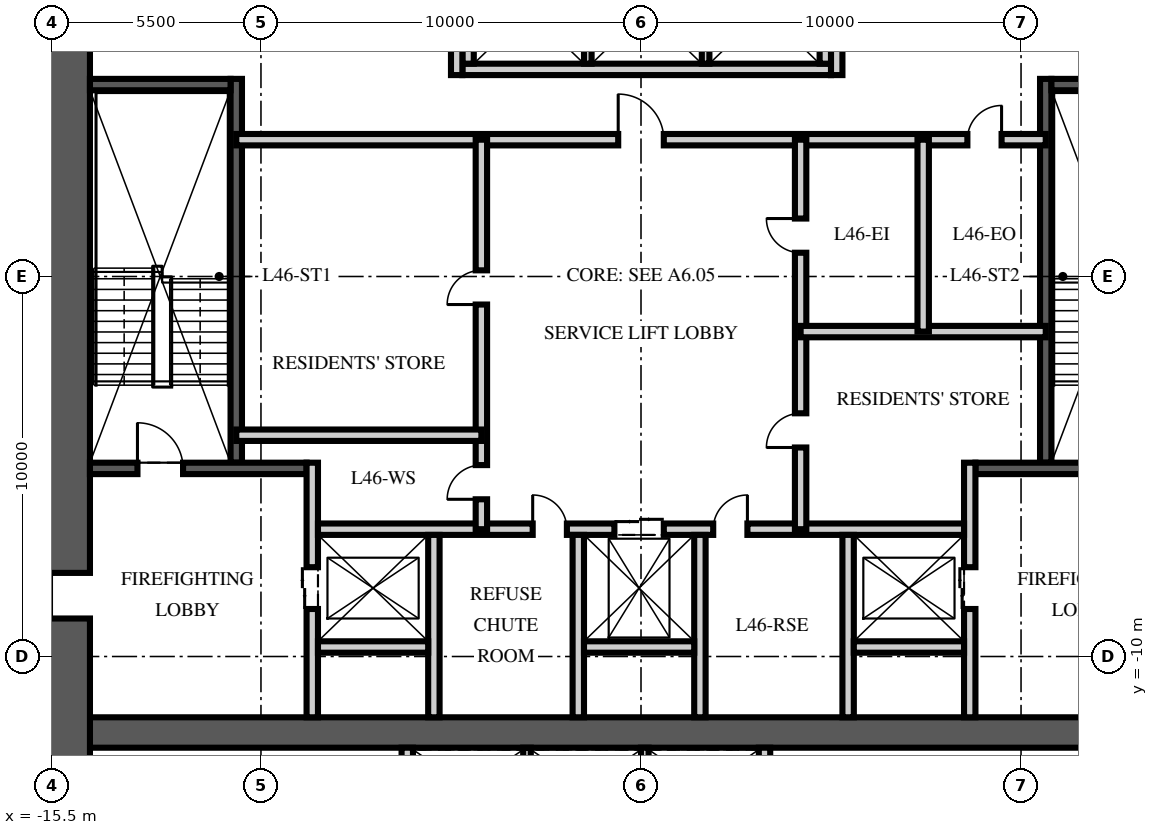
"""IFC4 building model, lengths in metres.
Left out: names, types, materials, properties, quantities, classifications, styles, units other than length and angle.
Written with IfcOpenShell. Run it as: python <this file> out.ifc"""

import sys

from ifc_helpers import new_model, si_unit, direction, frame, frame_2d, origin, place, context, subcontext, project, spatial, rectangle, extrude, element, fill, save


model = new_model("IFC4")
c1 = context("Model", 3, precision=1e-05, world=origin(), true_north=direction((0.0, 1.0)))
c2 = subcontext(c1, "Body", "Model", "MODEL_VIEW")
j1 = project(units=[si_unit("LENGTHUNIT", "METRE"), si_unit("PLANEANGLEUNIT", "RADIAN")], contexts=[c1])
p1 = place(None, origin())
s1 = spatial("IfcSite", under=j1, at=p1, CompositionType="ELEMENT")
p2 = place(p1, origin())
s2 = spatial("IfcBuilding", under=s1, at=p2, CompositionType="ELEMENT")
p3 = place(p2, frame((0.0, 0.0, 182.25)))
s3 = spatial("IfcBuildingStorey", under=s2, at=p3, CompositionType="ELEMENT", Elevation=182.25)
p4 = place(p3, frame((-15.5, -12.0, -0.25), z_axis=(0.0, 0.0, 1.0), x_axis=(1.0, 0.0, 0.0)))
e1 = element("IfcWall", 1, at=p4, inside=s3, PredefinedType="SHEAR", context=c2, shape_type="SweptSolid", body=[
    extrude(rectangle(XDim=31.0, YDim=0.8, at=frame_2d((15.5, 0.0))), origin(), (0.0, 0.0, 1.0), 3.7),
])
p5 = place(p3, frame((-15.5, -15.5, -0.25), z_axis=(0.0, 0.0, 1.0), x_axis=(0.0, 1.0, 0.0)))
e2 = element("IfcWall", 2, at=p5, inside=s3, PredefinedType="SHEAR", context=c2, shape_type="SweptSolid", body=[
    extrude(rectangle(XDim=31.0, YDim=2.0, at=frame_2d((15.5, 0.0))), origin(), (0.0, 0.0, 1.0), 3.7),
])
p6 = place(p5, frame((6.5, 0.0, 0.25)))
e3 = element("IfcOpeningElement", 3, at=p6, cuts=e2, PredefinedType="OPENING", context=c2, shape_type="SweptSolid", body=[
    extrude(rectangle(XDim=1.2, YDim=2.1, at=frame_2d((0.6, 1.05))), frame((0.0, 1.01, 0.0), z_axis=(0.0, -1.0, 0.0), x_axis=(1.0, 0.0, 0.0)), (0.0, 0.0, 1.0), 2.02),
])
p7 = place(p5, frame((23.0, 0.0, 0.25)))
e4 = element("IfcOpeningElement", 4, at=p7, cuts=e2, PredefinedType="OPENING", context=c2, shape_type="SweptSolid", body=[
    extrude(rectangle(XDim=1.8, YDim=2.1, at=frame_2d((0.9, 1.05))), frame((0.0, 1.01, 0.0), z_axis=(0.0, -1.0, 0.0), x_axis=(1.0, 0.0, 0.0)), (0.0, 0.0, 1.0), 2.02),
])
p8 = place(p3, frame((-10.65, -4.9, 0.0), z_axis=(0.0, 0.0, 1.0), x_axis=(0.0, 1.0, 0.0)))
e5 = element("IfcWall", 5, at=p8, inside=s3, PredefinedType="SOLIDWALL", context=c2, shape_type="SweptSolid", body=[
    extrude(rectangle(XDim=10.1, YDim=0.3, at=frame_2d((5.05, 0.0))), origin(), (0.0, 0.0, 1.0), 3.45),
])
p9 = place(p3, frame((-14.5, -5.05, 0.0), z_axis=(0.0, 0.0, 1.0), x_axis=(1.0, 0.0, 0.0)))
e6 = element("IfcWall", 6, at=p9, inside=s3, PredefinedType="SOLIDWALL", context=c2, shape_type="SweptSolid", body=[
    extrude(rectangle(XDim=5.7, YDim=0.3, at=frame_2d((2.85, 0.0))), origin(), (0.0, 0.0, 1.0), 3.45),
])
p10 = place(p9, frame((1.25, 0.0, 0.0)))
e7 = element("IfcOpeningElement", 7, at=p10, cuts=e6, PredefinedType="OPENING", context=c2, shape_type="SweptSolid", body=[
    extrude(rectangle(XDim=1.2, YDim=2.1, at=frame_2d((0.6, 1.05))), frame((0.0, 0.16, 0.0), z_axis=(0.0, -1.0, 0.0), x_axis=(1.0, 0.0, 0.0)), (0.0, 0.0, 1.0), 0.32),
])
p11 = place(p3, frame((-14.5, 5.05, 0.0), z_axis=(0.0, 0.0, 1.0), x_axis=(1.0, 0.0, 0.0)))
e8 = element("IfcWall", 8, at=p11, inside=s3, PredefinedType="SOLIDWALL", context=c2, shape_type="SweptSolid", body=[
    extrude(rectangle(XDim=3.7, YDim=0.3, at=frame_2d((1.85, 0.0))), origin(), (0.0, 0.0, 1.0), 3.45),
])
p12 = place(p3, frame((-8.65, -11.6, 0.0), z_axis=(0.0, 0.0, 1.0), x_axis=(0.0, 1.0, 0.0)))
e9 = element("IfcWall", 9, at=p12, inside=s3, PredefinedType="PARTITIONING", context=c2, shape_type="SweptSolid", body=[
    extrude(rectangle(XDim=6.7, YDim=0.3, at=frame_2d((3.35, 0.0))), origin(), (0.0, 0.0, 1.0), 3.45),
])
p13 = place(p12, frame((2.85, 0.0, 0.0)))
e10 = element("IfcOpeningElement", 10, at=p13, cuts=e9, PredefinedType="OPENING", context=c2, shape_type="SweptSolid", body=[
    extrude(rectangle(XDim=1.1, YDim=2.1, at=frame_2d((0.55, 1.05))), frame((0.0, 0.16, 0.0), z_axis=(0.0, -1.0, 0.0), x_axis=(1.0, 0.0, 0.0)), (0.0, 0.0, 1.0), 0.32),
])
p14 = place(p3, frame((10.65, -4.9, 0.0), z_axis=(0.0, 0.0, 1.0), x_axis=(0.0, 1.0, 0.0)))
e11 = element("IfcWall", 11, at=p14, inside=s3, PredefinedType="SOLIDWALL", context=c2, shape_type="SweptSolid", body=[
    extrude(rectangle(XDim=10.1, YDim=0.3, at=frame_2d((5.05, 0.0))), origin(), (0.0, 0.0, 1.0), 3.45),
])
p15 = place(p3, frame((14.5, -5.05, 0.0), z_axis=(0.0, 0.0, 1.0), x_axis=(-1.0, 0.0, 0.0)))
e12 = element("IfcWall", 12, at=p15, inside=s3, PredefinedType="SOLIDWALL", context=c2, shape_type="SweptSolid", body=[
    extrude(rectangle(XDim=5.7, YDim=0.3, at=frame_2d((2.85, 0.0))), origin(), (0.0, 0.0, 1.0), 3.45),
])
p16 = place(p15, frame((1.25, 0.0, 0.0)))
e13 = element("IfcOpeningElement", 13, at=p16, cuts=e12, PredefinedType="OPENING", context=c2, shape_type="SweptSolid", body=[
    extrude(rectangle(XDim=1.2, YDim=2.1, at=frame_2d((0.6, 1.05))), frame((0.0, 0.16, 0.0), z_axis=(0.0, -1.0, 0.0), x_axis=(1.0, 0.0, 0.0)), (0.0, 0.0, 1.0), 0.32),
])
p17 = place(p3, frame((14.5, 5.05, 0.0), z_axis=(0.0, 0.0, 1.0), x_axis=(-1.0, 0.0, 0.0)))
e14 = element("IfcWall", 14, at=p17, inside=s3, PredefinedType="SOLIDWALL", context=c2, shape_type="SweptSolid", body=[
    extrude(rectangle(XDim=3.7, YDim=0.3, at=frame_2d((1.85, 0.0))), origin(), (0.0, 0.0, 1.0), 3.45),
])
p18 = place(p3, frame((8.65, -11.6, 0.0), z_axis=(0.0, 0.0, 1.0), x_axis=(0.0, 1.0, 0.0)))
e15 = element("IfcWall", 15, at=p18, inside=s3, PredefinedType="PARTITIONING", context=c2, shape_type="SweptSolid", body=[
    extrude(rectangle(XDim=6.7, YDim=0.3, at=frame_2d((3.35, 0.0))), origin(), (0.0, 0.0, 1.0), 3.45),
])
p19 = place(p18, frame((2.85, 0.0, 0.0)))
e16 = element("IfcOpeningElement", 16, at=p19, cuts=e15, PredefinedType="OPENING", context=c2, shape_type="SweptSolid", body=[
    extrude(rectangle(XDim=1.1, YDim=2.1, at=frame_2d((0.55, 1.05))), frame((0.0, 0.16, 0.0), z_axis=(0.0, -1.0, 0.0), x_axis=(1.0, 0.0, 0.0)), (0.0, 0.0, 1.0), 0.32),
])
p20 = place(p3, frame((-8.5, -6.65, 0.0), z_axis=(0.0, 0.0, 1.0), x_axis=(1.0, 0.0, 0.0)))
e17 = element("IfcWall", 17, at=p20, inside=s3, PredefinedType="PARTITIONING", context=c2, shape_type="SweptSolid", body=[
    extrude(rectangle(XDim=17.0, YDim=0.3, at=frame_2d((8.5, 0.0))), origin(), (0.0, 0.0, 1.0), 3.45),
])
p21 = place(p20, frame((7.8, 0.0, 0.0)))
e18 = element("IfcOpeningElement", 18, at=p21, cuts=e17, PredefinedType="OPENING", context=c2, shape_type="SweptSolid", body=[
    extrude(rectangle(XDim=1.3, YDim=2.4, at=frame_2d((0.65, 1.2))), frame((0.0, 0.16, 0.0), z_axis=(0.0, -1.0, 0.0), x_axis=(1.0, 0.0, 0.0)), (0.0, 0.0, 1.0), 0.32),
])
p22 = place(p20, frame((5.65, 0.0, 0.0)))
e19 = element("IfcOpeningElement", 19, at=p22, cuts=e17, PredefinedType="OPENING", context=c2, shape_type="SweptSolid", body=[
    extrude(rectangle(XDim=0.9, YDim=2.1, at=frame_2d((0.45, 1.05))), frame((0.0, 0.16, 0.0), z_axis=(0.0, -1.0, 0.0), x_axis=(1.0, 0.0, 0.0)), (0.0, 0.0, 1.0), 0.32),
])
p23 = place(p20, frame((10.4, 0.0, 0.0)))
e20 = element("IfcOpeningElement", 20, at=p23, cuts=e17, PredefinedType="OPENING", context=c2, shape_type="SweptSolid", body=[
    extrude(rectangle(XDim=0.9, YDim=2.1, at=frame_2d((0.45, 1.05))), frame((0.0, 0.16, 0.0), z_axis=(0.0, -1.0, 0.0), x_axis=(1.0, 0.0, 0.0)), (0.0, 0.0, 1.0), 0.32),
])
for number, where, z_axis, x_axis in (
    (21, (-5.45, -11.6, 0.0), (0.0, 0.0, 1.0), (0.0, 1.0, 0.0)),
    (22, (-1.65, -11.6, 0.0), (0.0, 0.0, 1.0), (0.0, 1.0, 0.0)),
    (23, (1.55, -11.6, 0.0), (0.0, 0.0, 1.0), (0.0, 1.0, 0.0)),
    (24, (5.45, -11.6, 0.0), (0.0, 0.0, 1.0), (0.0, 1.0, 0.0)),
):
    element("IfcWall", number, at=place(p3, frame(where, z_axis=z_axis, x_axis=x_axis)), inside=s3, PredefinedType="PARTITIONING", context=c2, shape_type="SweptSolid", body=[
        extrude(rectangle(XDim=4.8, YDim=0.3, at=frame_2d((2.4, 0.0))), origin(), (0.0, 0.0, 1.0), 3.45),
    ])
for number, where, z_axis, x_axis in (
    (25, (-8.5, -9.75, 0.0), (0.0, 0.0, 1.0), (1.0, 0.0, 0.0)),
    (26, (-1.5, -9.75, 0.0), (0.0, 0.0, 1.0), (1.0, 0.0, 0.0)),
    (27, (5.6, -9.75, 0.0), (0.0, 0.0, 1.0), (1.0, 0.0, 0.0)),
):
    element("IfcWall", number, at=place(p3, frame(where, z_axis=z_axis, x_axis=x_axis)), inside=s3, PredefinedType="PARTITIONING", context=c2, shape_type="SweptSolid", body=[
        extrude(rectangle(XDim=2.9, YDim=0.3, at=frame_2d((1.45, 0.0))), origin(), (0.0, 0.0, 1.0), 3.45),
    ])
p24 = place(p3, frame((-4.7, 5.45, 0.0), z_axis=(0.0, 0.0, 1.0), x_axis=(1.0, 0.0, 0.0)))
e28 = element("IfcWall", 28, at=p24, inside=s3, PredefinedType="PARTITIONING", context=c2, shape_type="SweptSolid", body=[
    extrude(rectangle(XDim=9.7, YDim=0.3, at=frame_2d((4.85, 0.0))), origin(), (0.0, 0.0, 1.0), 3.45),
])
for number, where, z_axis, x_axis in (
    (29, (-4.55, 5.6, 0.0), (0.0, 0.0, 1.0), (0.0, 1.0, 0.0)),
    (30, (4.85, 5.6, 0.0), (0.0, 0.0, 1.0), (0.0, 1.0, 0.0)),
):
    element("IfcWall", number, at=place(p3, frame(where, z_axis=z_axis, x_axis=x_axis)), inside=s3, PredefinedType="PARTITIONING", context=c2, shape_type="SweptSolid", body=[
        extrude(rectangle(XDim=2.8, YDim=0.3, at=frame_2d((1.4, 0.0))), origin(), (0.0, 0.0, 1.0), 3.45),
    ])
for number, where, z_axis, x_axis in (
    (31, (-1.4, 5.6, 0.0), (0.0, 0.0, 1.0), (0.0, 1.0, 0.0)),
    (32, (1.7, 5.6, 0.0), (0.0, 0.0, 1.0), (0.0, 1.0, 0.0)),
):
    element("IfcWall", number, at=place(p3, frame(where, z_axis=z_axis, x_axis=x_axis)), inside=s3, PredefinedType="PARTITIONING", context=c2, shape_type="SweptSolid", body=[
        extrude(rectangle(XDim=2.8, YDim=0.2, at=frame_2d((1.4, 0.0))), origin(), (0.0, 0.0, 1.0), 3.45),
    ])
for number, where, z_axis, x_axis in (
    (33, (-6.15, -14.5, 0.0), (0.0, 0.0, 1.0), (0.0, 1.0, 0.0)),
    (34, (3.25, -14.5, 0.0), (0.0, 0.0, 1.0), (0.0, 1.0, 0.0)),
):
    element("IfcWall", number, at=place(p3, frame(where, z_axis=z_axis, x_axis=x_axis)), inside=s3, PredefinedType="PARTITIONING", context=c2, shape_type="SweptSolid", body=[
        extrude(rectangle(XDim=2.1, YDim=0.3, at=frame_2d((1.05, 0.0))), origin(), (0.0, 0.0, 1.0), 3.45),
    ])
for number, where, z_axis, x_axis in (
    (35, (-3.0, -14.5, 0.0), (0.0, 0.0, 1.0), (0.0, 1.0, 0.0)),
    (36, (0.1, -14.5, 0.0), (0.0, 0.0, 1.0), (0.0, 1.0, 0.0)),
):
    element("IfcWall", number, at=place(p3, frame(where, z_axis=z_axis, x_axis=x_axis)), inside=s3, PredefinedType="PARTITIONING", context=c2, shape_type="SweptSolid", body=[
        extrude(rectangle(XDim=2.1, YDim=0.2, at=frame_2d((1.05, 0.0))), origin(), (0.0, 0.0, 1.0), 3.45),
    ])
p25 = place(p3, frame((-10.65, 3.6, 0.0), z_axis=(0.0, 0.0, 1.0), x_axis=(1.0, 0.0, 0.0)))
e37 = element("IfcWall", 37, at=p25, inside=s3, PredefinedType="PARTITIONING", context=c2, shape_type="SweptSolid", body=[
    extrude(rectangle(XDim=21.3, YDim=0.3, at=frame_2d((10.65, 0.0))), origin(), (0.0, 0.0, 1.0), 3.45),
])
p26 = place(p25, frame((10.05, 0.0, 0.0)))
e38 = element("IfcOpeningElement", 38, at=p26, cuts=e37, PredefinedType="OPENING", context=c2, shape_type="SweptSolid", body=[
    extrude(rectangle(XDim=1.2, YDim=2.1, at=frame_2d((0.6, 1.05))), frame((0.0, 0.16, 0.0), z_axis=(0.0, -1.0, 0.0), x_axis=(1.0, 0.0, 0.0)), (0.0, 0.0, 1.0), 0.32),
])
p27 = place(p25, frame((19.238, 0.0, 0.0)))
e39 = element("IfcOpeningElement", 39, at=p27, cuts=e37, PredefinedType="OPENING", context=c2, shape_type="SweptSolid", body=[
    extrude(rectangle(XDim=0.9, YDim=2.1, at=frame_2d((0.45, 1.05))), frame((0.0, 0.16, 0.0), z_axis=(0.0, -1.0, 0.0), x_axis=(1.0, 0.0, 0.0)), (0.0, 0.0, 1.0), 0.32),
])
p28 = place(p3, frame((-4.2, -6.65, 0.0), z_axis=(0.0, 0.0, 1.0), x_axis=(0.0, 1.0, 0.0)))
e40 = element("IfcWall", 40, at=p28, inside=s3, PredefinedType="PARTITIONING", context=c2, shape_type="SweptSolid", body=[
    extrude(rectangle(XDim=10.25, YDim=0.3, at=frame_2d((5.125, 0.0))), origin(), (0.0, 0.0, 1.0), 3.45),
])
p29 = place(p28, frame((0.787, 0.0, 0.0)))
e41 = element("IfcOpeningElement", 41, at=p29, cuts=e40, PredefinedType="OPENING", context=c2, shape_type="SweptSolid", body=[
    extrude(rectangle(XDim=0.9, YDim=2.1, at=frame_2d((0.45, 1.05))), frame((0.0, 0.16, 0.0), z_axis=(0.0, -1.0, 0.0), x_axis=(1.0, 0.0, 0.0)), (0.0, 0.0, 1.0), 0.32),
])
p30 = place(p28, frame((5.912, 0.0, 0.0)))
e42 = element("IfcOpeningElement", 42, at=p30, cuts=e40, PredefinedType="OPENING", context=c2, shape_type="SweptSolid", body=[
    extrude(rectangle(XDim=0.9, YDim=2.1, at=frame_2d((0.45, 1.05))), frame((0.0, 0.16, 0.0), z_axis=(0.0, -1.0, 0.0), x_axis=(1.0, 0.0, 0.0)), (0.0, 0.0, 1.0), 0.32),
])
p31 = place(p3, frame((4.2, -6.65, 0.0), z_axis=(0.0, 0.0, 1.0), x_axis=(0.0, 1.0, 0.0)))
e43 = element("IfcWall", 43, at=p31, inside=s3, PredefinedType="PARTITIONING", context=c2, shape_type="SweptSolid", body=[
    extrude(rectangle(XDim=10.25, YDim=0.3, at=frame_2d((5.125, 0.0))), origin(), (0.0, 0.0, 1.0), 3.45),
])
p32 = place(p31, frame((2.15, 0.0, 0.0)))
e44 = element("IfcOpeningElement", 44, at=p32, cuts=e43, PredefinedType="OPENING", context=c2, shape_type="SweptSolid", body=[
    extrude(rectangle(XDim=0.9, YDim=2.1, at=frame_2d((0.45, 1.05))), frame((0.0, 0.16, 0.0), z_axis=(0.0, -1.0, 0.0), x_axis=(1.0, 0.0, 0.0)), (0.0, 0.0, 1.0), 0.32),
])
p33 = place(p31, frame((7.275, 0.0, 0.0)))
e45 = element("IfcOpeningElement", 45, at=p33, cuts=e43, PredefinedType="OPENING", context=c2, shape_type="SweptSolid", body=[
    extrude(rectangle(XDim=0.9, YDim=2.1, at=frame_2d((0.45, 1.05))), frame((0.0, 0.16, 0.0), z_axis=(0.0, -1.0, 0.0), x_axis=(1.0, 0.0, 0.0)), (0.0, 0.0, 1.0), 0.32),
])
for number, where, z_axis, x_axis in (
    (46, (-10.65, -4.177, 0.0), (0.0, 0.0, 1.0), (1.0, 0.0, 0.0)),
    (47, (10.65, -1.45, 0.0), (0.0, 0.0, 1.0), (-1.0, 0.0, 0.0)),
):
    element("IfcWall", number, at=place(p3, frame(where, z_axis=z_axis, x_axis=x_axis)), inside=s3, PredefinedType="PARTITIONING", context=c2, shape_type="SweptSolid", body=[
        extrude(rectangle(XDim=6.45, YDim=0.3, at=frame_2d((3.225, 0.0))), origin(), (0.0, 0.0, 1.0), 3.45),
    ])
p34 = place(p3, frame((7.425, -1.45, 0.0), z_axis=(0.0, 0.0, 1.0), x_axis=(0.0, 1.0, 0.0)))
e48 = element("IfcWall", 48, at=p34, inside=s3, PredefinedType="PARTITIONING", context=c2, shape_type="SweptSolid", body=[
    extrude(rectangle(XDim=5.05, YDim=0.3, at=frame_2d((2.525, 0.0))), origin(), (0.0, 0.0, 1.0), 3.45),
])
p35 = place(p3, frame((-4.85, 5.3, 0.0), z_axis=(0.0, 0.0, 1.0), x_axis=(0.0, 1.0, 0.0)))
e49 = element("IfcWall", 49, at=p35, inside=s3, PredefinedType="PARTITIONING", context=c2, shape_type="SweptSolid", body=[
    extrude(rectangle(XDim=6.3, YDim=0.3, at=frame_2d((3.15, 0.0))), origin(), (0.0, 0.0, 1.0), 3.45),
])
p36 = place(p35, frame((4.35, 0.0, 0.0)))
e50 = element("IfcOpeningElement", 50, at=p36, cuts=e49, PredefinedType="OPENING", context=c2, shape_type="SweptSolid", body=[
    extrude(rectangle(XDim=0.9, YDim=2.1, at=frame_2d((0.45, 1.05))), frame((0.0, 0.16, 0.0), z_axis=(0.0, -1.0, 0.0), x_axis=(1.0, 0.0, 0.0)), (0.0, 0.0, 1.0), 0.32),
])
p37 = place(p3, frame((5.15, 5.3, 0.0), z_axis=(0.0, 0.0, 1.0), x_axis=(0.0, 1.0, 0.0)))
e51 = element("IfcWall", 51, at=p37, inside=s3, PredefinedType="PARTITIONING", context=c2, shape_type="SweptSolid", body=[
    extrude(rectangle(XDim=6.3, YDim=0.3, at=frame_2d((3.15, 0.0))), origin(), (0.0, 0.0, 1.0), 3.45),
])
p38 = place(p37, frame((4.35, 0.0, 0.0)))
e52 = element("IfcOpeningElement", 52, at=p38, cuts=e51, PredefinedType="OPENING", context=c2, shape_type="SweptSolid", body=[
    extrude(rectangle(XDim=0.9, YDim=2.1, at=frame_2d((0.45, 1.05))), frame((0.0, 0.16, 0.0), z_axis=(0.0, -1.0, 0.0), x_axis=(1.0, 0.0, 0.0)), (0.0, 0.0, 1.0), 0.32),
])
p39 = place(p10, origin())
e53 = element("IfcDoor", 53, at=p39, inside=s3, OperationType="SINGLE_SWING_LEFT", PredefinedType="DOOR", context=c2, shape_type="SweptSolid", body=[
    extrude(rectangle(XDim=1.2, YDim=2.1, at=frame_2d((0.6, 1.05))), frame((0.0, 0.025, 0.0), z_axis=(0.0, -1.0, 0.0), x_axis=(1.0, 0.0, 0.0)), (0.0, 0.0, 1.0), 0.05),
])
fill(e7, e53)
p40 = place(p6, origin())
e54 = element("IfcDoor", 54, at=p40, inside=s3, OperationType="SINGLE_SWING_LEFT", PredefinedType="DOOR", context=c2, shape_type="SweptSolid", body=[
    extrude(rectangle(XDim=1.2, YDim=2.1, at=frame_2d((0.6, 1.05))), frame((0.0, 0.025, 0.0), z_axis=(0.0, -1.0, 0.0), x_axis=(1.0, 0.0, 0.0)), (0.0, 0.0, 1.0), 0.05),
])
fill(e3, e54)
p41 = place(p13, origin())
e55 = element("IfcDoor", 55, at=p41, inside=s3, OperationType="DOUBLE_DOOR_SLIDING", PredefinedType="DOOR", context=c2, shape_type="SweptSolid", body=[
    extrude(rectangle(XDim=1.1, YDim=2.1, at=frame_2d((0.55, 1.05))), frame((0.0, 0.025, 0.0), z_axis=(0.0, -1.0, 0.0), x_axis=(1.0, 0.0, 0.0)), (0.0, 0.0, 1.0), 0.05),
])
fill(e10, e55)
p42 = place(p19, origin())
e56 = element("IfcDoor", 56, at=p42, inside=s3, OperationType="DOUBLE_DOOR_SLIDING", PredefinedType="DOOR", context=c2, shape_type="SweptSolid", body=[
    extrude(rectangle(XDim=1.1, YDim=2.1, at=frame_2d((0.55, 1.05))), frame((0.0, 0.025, 0.0), z_axis=(0.0, -1.0, 0.0), x_axis=(1.0, 0.0, 0.0)), (0.0, 0.0, 1.0), 0.05),
])
fill(e16, e56)
p43 = place(p21, origin())
e57 = element("IfcDoor", 57, at=p43, inside=s3, OperationType="DOUBLE_DOOR_SLIDING", PredefinedType="DOOR", context=c2, shape_type="SweptSolid", body=[
    extrude(rectangle(XDim=1.3, YDim=2.4, at=frame_2d((0.65, 1.2))), frame((0.0, 0.025, 0.0), z_axis=(0.0, -1.0, 0.0), x_axis=(1.0, 0.0, 0.0)), (0.0, 0.0, 1.0), 0.05),
])
fill(e18, e57)
p44 = place(p26, origin())
e58 = element("IfcDoor", 58, at=p44, inside=s3, OperationType="SINGLE_SWING_LEFT", PredefinedType="DOOR", context=c2, shape_type="SweptSolid", body=[
    extrude(rectangle(XDim=1.2, YDim=2.1, at=frame_2d((0.6, 1.05))), frame((0.0, 0.025, 0.0), z_axis=(0.0, -1.0, 0.0), x_axis=(1.0, 0.0, 0.0)), (0.0, 0.0, 1.0), 0.05),
])
fill(e38, e58)
p45 = place(p22, origin())
e59 = element("IfcDoor", 59, at=p45, inside=s3, OperationType="SINGLE_SWING_LEFT", PredefinedType="DOOR", context=c2, shape_type="SweptSolid", body=[
    extrude(rectangle(XDim=0.9, YDim=2.1, at=frame_2d((0.45, 1.05))), frame((0.0, 0.025, 0.0), z_axis=(0.0, -1.0, 0.0), x_axis=(1.0, 0.0, 0.0)), (0.0, 0.0, 1.0), 0.05),
])
fill(e19, e59)
p46 = place(p23, origin())
e60 = element("IfcDoor", 60, at=p46, inside=s3, OperationType="SINGLE_SWING_RIGHT", PredefinedType="DOOR", context=c2, shape_type="SweptSolid", body=[
    extrude(rectangle(XDim=0.9, YDim=2.1, at=frame_2d((0.45, 1.05))), frame((0.0, 0.025, 0.0), z_axis=(0.0, -1.0, 0.0), x_axis=(1.0, 0.0, 0.0)), (0.0, 0.0, 1.0), 0.05),
])
fill(e20, e60)
p47 = place(p29, origin())
e61 = element("IfcDoor", 61, at=p47, inside=s3, OperationType="SINGLE_SWING_LEFT", PredefinedType="DOOR", context=c2, shape_type="SweptSolid", body=[
    extrude(rectangle(XDim=0.9, YDim=2.1, at=frame_2d((0.45, 1.05))), frame((0.0, 0.025, 0.0), z_axis=(0.0, -1.0, 0.0), x_axis=(1.0, 0.0, 0.0)), (0.0, 0.0, 1.0), 0.05),
])
fill(e41, e61)
p48 = place(p30, origin())
e62 = element("IfcDoor", 62, at=p48, inside=s3, OperationType="SINGLE_SWING_LEFT", PredefinedType="DOOR", context=c2, shape_type="SweptSolid", body=[
    extrude(rectangle(XDim=0.9, YDim=2.1, at=frame_2d((0.45, 1.05))), frame((0.0, 0.025, 0.0), z_axis=(0.0, -1.0, 0.0), x_axis=(1.0, 0.0, 0.0)), (0.0, 0.0, 1.0), 0.05),
])
fill(e42, e62)
p49 = place(p32, origin())
e63 = element("IfcDoor", 63, at=p49, inside=s3, OperationType="SINGLE_SWING_LEFT", PredefinedType="DOOR", context=c2, shape_type="SweptSolid", body=[
    extrude(rectangle(XDim=0.9, YDim=2.1, at=frame_2d((0.45, 1.05))), frame((0.0, 0.025, 0.0), z_axis=(0.0, -1.0, 0.0), x_axis=(1.0, 0.0, 0.0)), (0.0, 0.0, 1.0), 0.05),
])
fill(e44, e63)
p50 = place(p33, origin())
e64 = element("IfcDoor", 64, at=p50, inside=s3, OperationType="SINGLE_SWING_RIGHT", PredefinedType="DOOR", context=c2, shape_type="SweptSolid", body=[
    extrude(rectangle(XDim=0.9, YDim=2.1, at=frame_2d((0.45, 1.05))), frame((0.0, 0.025, 0.0), z_axis=(0.0, -1.0, 0.0), x_axis=(1.0, 0.0, 0.0)), (0.0, 0.0, 1.0), 0.05),
])
fill(e45, e64)
p51 = place(p27, origin())
e65 = element("IfcDoor", 65, at=p51, inside=s3, OperationType="SINGLE_SWING_RIGHT", PredefinedType="DOOR", context=c2, shape_type="SweptSolid", body=[
    extrude(rectangle(XDim=0.9, YDim=2.1, at=frame_2d((0.45, 1.05))), frame((0.0, 0.025, 0.0), z_axis=(0.0, -1.0, 0.0), x_axis=(1.0, 0.0, 0.0)), (0.0, 0.0, 1.0), 0.05),
])
fill(e39, e65)
save(model, sys.argv[1])
